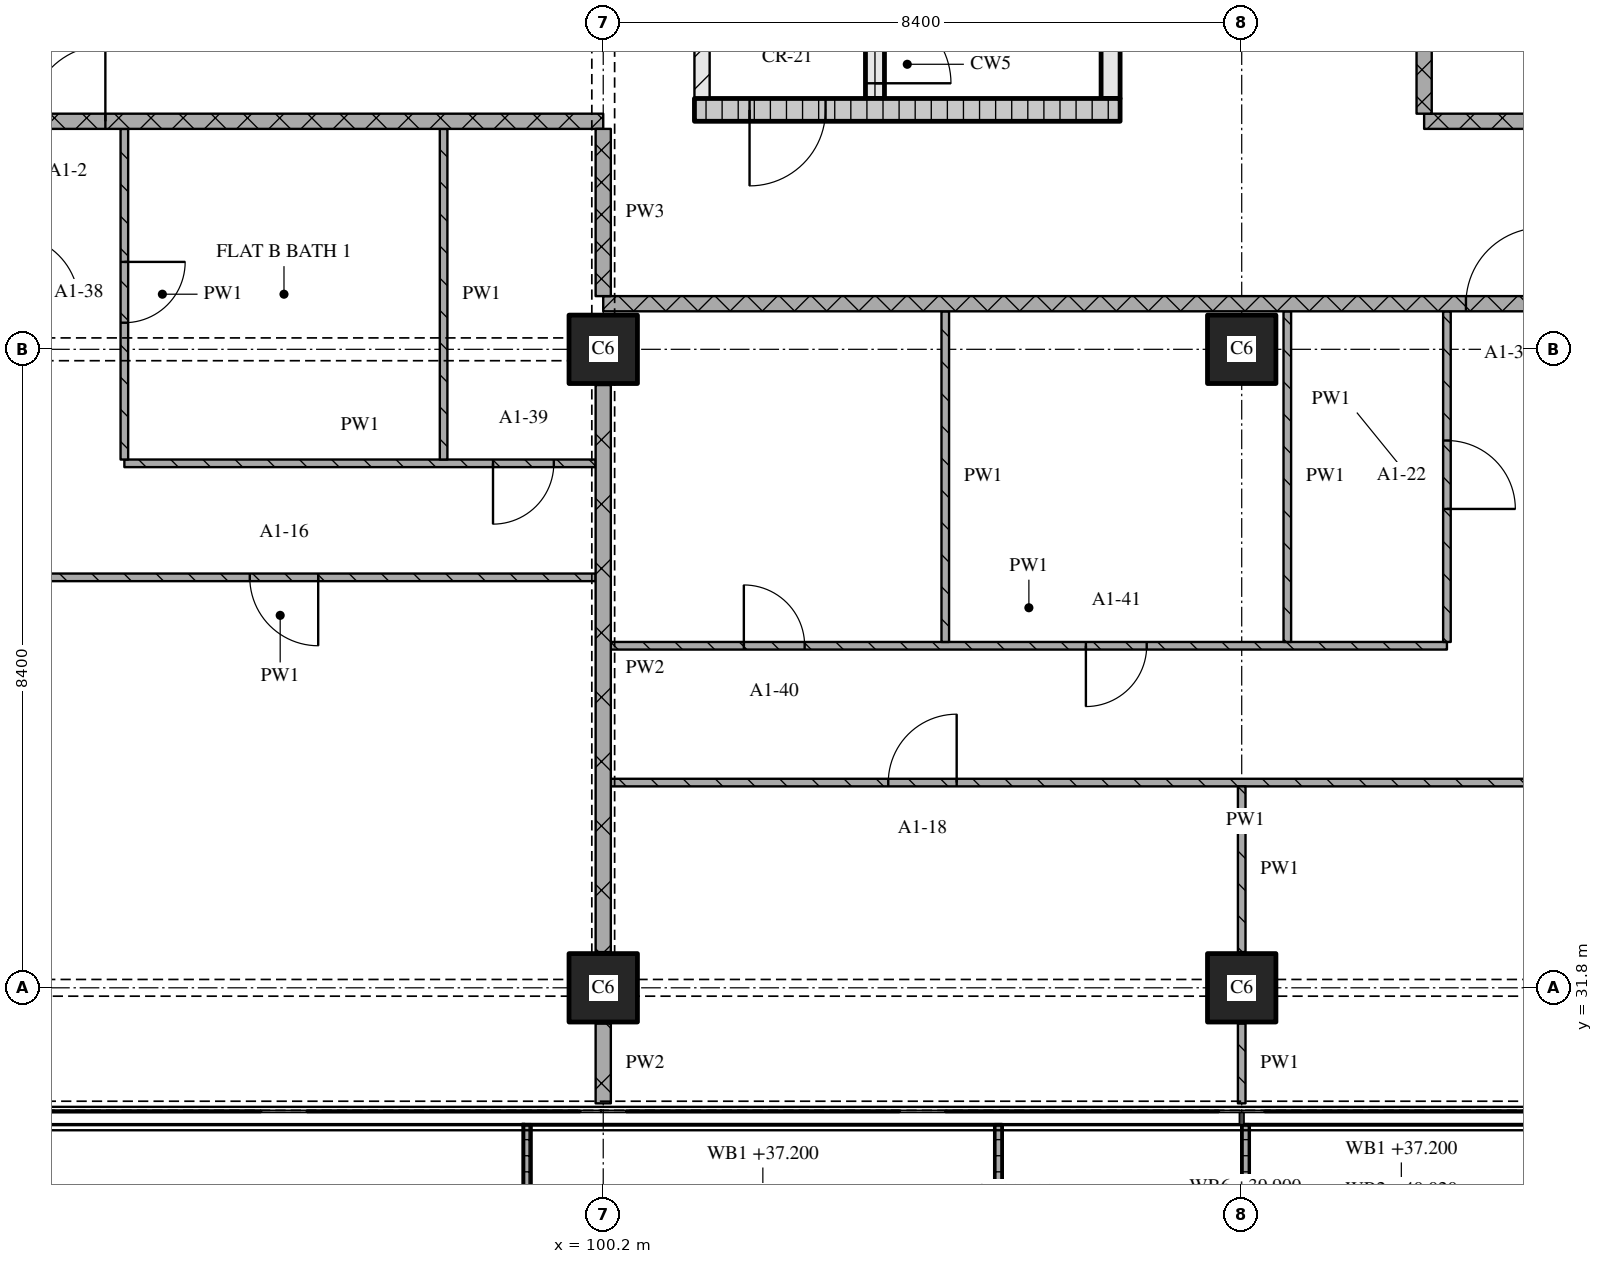
"""IFC4 building model, lengths in metres.
Left out: names, types, materials, properties, quantities, classifications, styles, units other than length and angle.
Written with IfcOpenShell. Run it as: python <this file> out.ifc"""

import sys

from ifc_helpers import new_model, si_unit, direction, frame, frame_2d, origin, origin_2d, place, context, subcontext, project, spatial, polyline, rectangle, outline, extrude, element, fill, save


model = new_model("IFC4")
c1 = context("Model", 3, precision=1e-05, world=origin(), true_north=direction((0.0, 1.0)))
c2 = subcontext(c1, "Body", "Model", "MODEL_VIEW")
j1 = project(units=[si_unit("LENGTHUNIT", "METRE"), si_unit("PLANEANGLEUNIT", "RADIAN")], contexts=[c1])
p1 = place(None, origin())
s1 = spatial("IfcSite", under=j1, at=p1, CompositionType="ELEMENT")
p2 = place(p1, origin())
s2 = spatial("IfcBuilding", under=s1, at=p2, CompositionType="ELEMENT")
p3 = place(p2, frame((0.0, 0.0, 37.2)))
s3 = spatial("IfcBuildingStorey", under=s2, at=p3, CompositionType="ELEMENT", Elevation=37.2)
for number, where, z_axis, x_axis in (
    (1, (100.2, 31.8, 0.0), (0.0, 0.0, 1.0), (1.0, 0.0, 0.0)),
    (2, (100.2, 40.2, 0.0), (0.0, 0.0, 1.0), (1.0, 0.0, 0.0)),
    (3, (108.6, 31.8, 0.0), (0.0, 0.0, 1.0), (1.0, 0.0, 0.0)),
    (4, (108.6, 40.2, 0.0), (0.0, 0.0, 1.0), (1.0, 0.0, 0.0)),
):
    element("IfcColumn", number, at=place(p3, frame(where, z_axis=z_axis, x_axis=x_axis)), inside=s3, PredefinedType="COLUMN", context=c2, shape_type="SweptSolid", body=[
        extrude(rectangle(XDim=0.9, YDim=0.9, at=origin_2d()), origin(), (0.0, 0.0, 1.0), 3.6),
    ])
p4 = place(p3, origin())
e5 = element("IfcWall", 5, at=p4, inside=s3, PredefinedType="SOLIDWALL", context=c2, shape_type="SweptSolid", body=[
    extrude(outline(polyline([(99.15, 30.0), (99.25, 30.0), (99.25, 28.233), (105.35, 28.233), (105.35, 30.0), (105.45, 30.0), (105.45, 28.133), (99.15, 28.133), (99.15, 30.0)])), origin(), (0.0, 0.0, 1.0), 1.0),
])
p5 = place(p3, origin())
e6 = element("IfcWall", 6, at=p5, inside=s3, PredefinedType="SOLIDWALL", context=c2, shape_type="SweptSolid", body=[
    extrude(outline(polyline([(108.6, 30.0), (108.7, 30.0), (108.7, 28.367), (112.7, 28.367), (112.7, 30.0), (112.8, 30.0), (112.8, 28.267), (108.6, 28.267), (108.6, 30.0)])), origin(), (0.0, 0.0, 1.0), 1.0),
])
p6 = place(p3, frame((101.4, 43.35, 0.0), z_axis=(0.0, 0.0, 1.0), x_axis=(1.0, 0.0, 0.0)))
e7 = element("IfcWall", 7, at=p6, inside=s3, PredefinedType="SOLIDWALL", context=c2, shape_type="SweptSolid", body=[
    extrude(rectangle(XDim=5.6, YDim=0.3, at=frame_2d((2.8, 0.0))), origin(), (0.0, 0.0, 1.0), 3.32),
])
p7 = place(p6, frame((0.725, 0.0, 0.0)))
e8 = element("IfcOpeningElement", 8, at=p7, cuts=e7, PredefinedType="OPENING", context=c2, shape_type="SweptSolid", body=[
    extrude(rectangle(XDim=1.0, YDim=2.1, at=frame_2d((0.5, 1.05))), frame((0.0, 0.16, 0.0), z_axis=(0.0, -1.0, 0.0), x_axis=(1.0, 0.0, 0.0)), (0.0, 0.0, 1.0), 0.32),
])
p8 = place(p3, frame((101.5, 43.5, 0.0), z_axis=(0.0, 0.0, 1.0), x_axis=(0.0, 1.0, 0.0)))
e9 = element("IfcWall", 9, at=p8, inside=s3, PredefinedType="PARTITIONING", context=c2, shape_type="SweptSolid", body=[
    extrude(rectangle(XDim=6.9, YDim=0.2, at=frame_2d((3.45, 0.0))), origin(), (0.0, 0.0, 1.0), 3.32),
])
p9 = place(p8, frame((1.0, 0.0, 0.0)))
e10 = element("IfcOpeningElement", 10, at=p9, cuts=e9, PredefinedType="OPENING", context=c2, shape_type="SweptSolid", body=[
    extrude(rectangle(XDim=1.0, YDim=2.1, at=frame_2d((0.5, 1.05))), frame((0.0, 0.11, 0.0), z_axis=(0.0, -1.0, 0.0), x_axis=(1.0, 0.0, 0.0)), (0.0, 0.0, 1.0), 0.22),
])
p10 = place(p3, frame((103.775, 43.5, 0.0), z_axis=(0.0, 0.0, 1.0), x_axis=(0.0, 1.0, 0.0)))
e11 = element("IfcWall", 11, at=p10, inside=s3, PredefinedType="SOLIDWALL", context=c2, shape_type="SweptSolid", body=[
    extrude(rectangle(XDim=6.9, YDim=0.25, at=frame_2d((3.45, 0.0))), origin(), (0.0, 0.0, 1.0), 3.32),
])
p11 = place(p10, frame((0.2, 0.0, 0.0)))
e12 = element("IfcOpeningElement", 12, at=p11, cuts=e11, PredefinedType="OPENING", context=c2, shape_type="SweptSolid", body=[
    extrude(rectangle(XDim=1.0, YDim=2.1, at=frame_2d((0.5, 1.05))), frame((0.0, 0.135, 0.0), z_axis=(0.0, -1.0, 0.0), x_axis=(1.0, 0.0, 0.0)), (0.0, 0.0, 1.0), 0.27),
])
p12 = place(p3, frame((106.875, 43.5, 0.0), z_axis=(0.0, 0.0, 1.0), x_axis=(0.0, 1.0, 0.0)))
e13 = element("IfcWall", 13, at=p12, inside=s3, PredefinedType="SOLIDWALL", context=c2, shape_type="SweptSolid", body=[
    extrude(rectangle(XDim=6.9, YDim=0.25, at=frame_2d((3.45, 0.0))), origin(), (0.0, 0.0, 1.0), 3.32),
])
p13 = place(p3, frame((117.0, 34.5, 0.0), z_axis=(0.0, 0.0, 1.0), x_axis=(-1.0, 0.0, 0.0)))
e14 = element("IfcWall", 14, at=p13, inside=s3, PredefinedType="PARTITIONING", context=c2, shape_type="SweptSolid", body=[
    extrude(rectangle(XDim=16.7, YDim=0.1, at=frame_2d((8.35, 0.0))), origin(), (0.0, 0.0, 1.0), 3.32),
])
p14 = place(p13, frame((12.15, 0.0, 0.0)))
e15 = element("IfcOpeningElement", 15, at=p14, cuts=e14, PredefinedType="OPENING", context=c2, shape_type="SweptSolid", body=[
    extrude(rectangle(XDim=0.9, YDim=2.1, at=frame_2d((0.45, 1.05))), frame((0.0, 0.06, 0.0), z_axis=(0.0, -1.0, 0.0), x_axis=(1.0, 0.0, 0.0)), (0.0, 0.0, 1.0), 0.12),
])
p15 = place(p3, frame((100.3, 36.3, 0.0), z_axis=(0.0, 0.0, 1.0), x_axis=(1.0, 0.0, 0.0)))
e16 = element("IfcWall", 16, at=p15, inside=s3, PredefinedType="PARTITIONING", context=c2, shape_type="SweptSolid", body=[
    extrude(rectangle(XDim=11.0, YDim=0.1, at=frame_2d((5.5, 0.0))), origin(), (0.0, 0.0, 1.0), 3.32),
])
p16 = place(p15, frame((1.75, 0.0, 0.0)))
e17 = element("IfcOpeningElement", 17, at=p16, cuts=e16, PredefinedType="OPENING", context=c2, shape_type="SweptSolid", body=[
    extrude(rectangle(XDim=0.8, YDim=2.1, at=frame_2d((0.4, 1.05))), frame((0.0, 0.06, 0.0), z_axis=(0.0, -1.0, 0.0), x_axis=(1.0, 0.0, 0.0)), (0.0, 0.0, 1.0), 0.12),
])
p17 = place(p15, frame((6.25, 0.0, 0.0)))
e18 = element("IfcOpeningElement", 18, at=p17, cuts=e16, PredefinedType="OPENING", context=c2, shape_type="SweptSolid", body=[
    extrude(rectangle(XDim=0.8, YDim=2.1, at=frame_2d((0.4, 1.05))), frame((0.0, 0.06, 0.0), z_axis=(0.0, -1.0, 0.0), x_axis=(1.0, 0.0, 0.0)), (0.0, 0.0, 1.0), 0.12),
])
p18 = place(p3, frame((100.1, 37.2, 0.0), z_axis=(0.0, 0.0, 1.0), x_axis=(-1.0, 0.0, 0.0)))
e19 = element("IfcWall", 19, at=p18, inside=s3, PredefinedType="PARTITIONING", context=c2, shape_type="SweptSolid", body=[
    extrude(rectangle(XDim=8.3, YDim=0.1, at=frame_2d((4.15, 0.0))), origin(), (0.0, 0.0, 1.0), 3.32),
])
p19 = place(p18, frame((3.65, 0.0, 0.0)))
e20 = element("IfcOpeningElement", 20, at=p19, cuts=e19, PredefinedType="OPENING", context=c2, shape_type="SweptSolid", body=[
    extrude(rectangle(XDim=0.9, YDim=2.1, at=frame_2d((0.45, 1.05))), frame((0.0, 0.06, 0.0), z_axis=(0.0, -1.0, 0.0), x_axis=(1.0, 0.0, 0.0)), (0.0, 0.0, 1.0), 0.12),
])
p20 = place(p3, frame((93.9, 38.7, 0.0), z_axis=(0.0, 0.0, 1.0), x_axis=(1.0, 0.0, 0.0)))
e21 = element("IfcWall", 21, at=p20, inside=s3, PredefinedType="PARTITIONING", context=c2, shape_type="SweptSolid", body=[
    extrude(rectangle(XDim=6.2, YDim=0.1, at=frame_2d((3.1, 0.0))), origin(), (0.0, 0.0, 1.0), 3.32),
])
p21 = place(p20, frame((4.85, 0.0, 0.0)))
e22 = element("IfcOpeningElement", 22, at=p21, cuts=e21, PredefinedType="OPENING", context=c2, shape_type="SweptSolid", body=[
    extrude(rectangle(XDim=0.8, YDim=2.1, at=frame_2d((0.4, 1.05))), frame((0.0, 0.06, 0.0), z_axis=(0.0, -1.0, 0.0), x_axis=(1.0, 0.0, 0.0)), (0.0, 0.0, 1.0), 0.12),
])
p22 = place(p3, frame((124.28, 40.8, 0.0), z_axis=(0.0, 0.0, 1.0), x_axis=(-1.0, 0.0, 0.0)))
e23 = element("IfcWall", 23, at=p22, inside=s3, PredefinedType="PARTITIONING", context=c2, shape_type="SweptSolid", body=[
    extrude(rectangle(XDim=24.08, YDim=0.2, at=frame_2d((12.04, 0.0))), origin(), (0.0, 0.0, 1.0), 3.32),
])
p23 = place(p22, frame((11.73, 0.0, 0.0)))
e24 = element("IfcOpeningElement", 24, at=p23, cuts=e23, PredefinedType="OPENING", context=c2, shape_type="SweptSolid", body=[
    extrude(rectangle(XDim=1.0, YDim=2.1, at=frame_2d((0.5, 1.05))), frame((0.0, 0.11, 0.0), z_axis=(0.0, -1.0, 0.0), x_axis=(1.0, 0.0, 0.0)), (0.0, 0.0, 1.0), 0.22),
])
p24 = place(p3, frame((100.2, 43.2, 0.0), z_axis=(0.0, 0.0, 1.0), x_axis=(-1.0, 0.0, 0.0)))
e25 = element("IfcWall", 25, at=p24, inside=s3, PredefinedType="PARTITIONING", context=c2, shape_type="SweptSolid", body=[
    extrude(rectangle(XDim=25.2, YDim=0.2, at=frame_2d((12.6, 0.0))), origin(), (0.0, 0.0, 1.0), 3.32),
])
p25 = place(p24, frame((6.55, 0.0, 0.0)))
e26 = element("IfcOpeningElement", 26, at=p25, cuts=e25, PredefinedType="OPENING", context=c2, shape_type="SweptSolid", body=[
    extrude(rectangle(XDim=1.0, YDim=2.1, at=frame_2d((0.5, 1.05))), frame((0.0, 0.11, 0.0), z_axis=(0.0, -1.0, 0.0), x_axis=(1.0, 0.0, 0.0)), (0.0, 0.0, 1.0), 0.22),
])
p26 = place(p3, frame((111.0, 43.2, 0.0), z_axis=(0.0, 0.0, 1.0), x_axis=(1.0, 0.0, 0.0)))
e27 = element("IfcWall", 27, at=p26, inside=s3, PredefinedType="PARTITIONING", context=c2, shape_type="SweptSolid", body=[
    extrude(rectangle(XDim=15.92, YDim=0.2, at=frame_2d((7.96, 0.0))), origin(), (0.0, 0.0, 1.0), 3.32),
])
p27 = place(p26, frame((10.05, 0.0, 0.0)))
e28 = element("IfcOpeningElement", 28, at=p27, cuts=e27, PredefinedType="OPENING", context=c2, shape_type="SweptSolid", body=[
    extrude(rectangle(XDim=1.0, YDim=2.1, at=frame_2d((0.5, 1.05))), frame((0.0, 0.11, 0.0), z_axis=(0.0, -1.0, 0.0), x_axis=(1.0, 0.0, 0.0)), (0.0, 0.0, 1.0), 0.22),
])
p28 = place(p3, frame((93.9, 43.1, 0.0), z_axis=(0.0, 0.0, 1.0), x_axis=(0.0, -1.0, 0.0)))
e29 = element("IfcWall", 29, at=p28, inside=s3, PredefinedType="PARTITIONING", context=c2, shape_type="SweptSolid", body=[
    extrude(rectangle(XDim=4.35, YDim=0.1, at=frame_2d((2.175, 0.0))), origin(), (0.0, 0.0, 1.0), 3.32),
])
p29 = place(p28, frame((1.75, 0.0, 0.0)))
e30 = element("IfcOpeningElement", 30, at=p29, cuts=e29, PredefinedType="OPENING", context=c2, shape_type="SweptSolid", body=[
    extrude(rectangle(XDim=0.8, YDim=2.1, at=frame_2d((0.4, 1.05))), frame((0.0, 0.06, 0.0), z_axis=(0.0, -1.0, 0.0), x_axis=(1.0, 0.0, 0.0)), (0.0, 0.0, 1.0), 0.12),
])
p30 = place(p3, frame((98.1, 43.1, 0.0), z_axis=(0.0, 0.0, 1.0), x_axis=(0.0, -1.0, 0.0)))
e31 = element("IfcWall", 31, at=p30, inside=s3, PredefinedType="PARTITIONING", context=c2, shape_type="SweptSolid", body=[
    extrude(rectangle(XDim=4.35, YDim=0.1, at=frame_2d((2.175, 0.0))), origin(), (0.0, 0.0, 1.0), 3.32),
])
p31 = place(p3, frame((100.2, 43.1, 0.0), z_axis=(0.0, 0.0, 1.0), x_axis=(0.0, -1.0, 0.0)))
e32 = element("IfcWall", 32, at=p31, inside=s3, PredefinedType="PARTITIONING", context=c2, shape_type="SweptSolid", body=[
    extrude(rectangle(XDim=2.2, YDim=0.2, at=frame_2d((1.1, 0.0))), origin(), (0.0, 0.0, 1.0), 2.43),
])
p32 = place(p3, frame((100.2, 31.33, 0.0), z_axis=(0.0, 0.0, 1.0), x_axis=(0.0, -1.0, 0.0)))
e33 = element("IfcWall", 33, at=p32, inside=s3, PredefinedType="PARTITIONING", context=c2, shape_type="SweptSolid", body=[
    extrude(rectangle(XDim=1.05, YDim=0.2, at=frame_2d((0.525, 0.0))), origin(), (0.0, 0.0, 1.0), 3.32),
])
p33 = place(p3, frame((100.2, 39.73, 0.0), z_axis=(0.0, 0.0, 1.0), x_axis=(0.0, -1.0, 0.0)))
e34 = element("IfcWall", 34, at=p33, inside=s3, PredefinedType="PARTITIONING", context=c2, shape_type="SweptSolid", body=[
    extrude(rectangle(XDim=7.46, YDim=0.2, at=frame_2d((3.73, 0.0))), origin(), (0.0, 0.0, 1.0), 2.83),
])
p34 = place(p3, frame((104.7, 40.7, 0.0), z_axis=(0.0, 0.0, 1.0), x_axis=(0.0, -1.0, 0.0)))
e35 = element("IfcWall", 35, at=p34, inside=s3, PredefinedType="PARTITIONING", context=c2, shape_type="SweptSolid", body=[
    extrude(rectangle(XDim=4.35, YDim=0.1, at=frame_2d((2.175, 0.0))), origin(), (0.0, 0.0, 1.0), 3.32),
])
p35 = place(p3, frame((108.6, 31.33, 0.0), z_axis=(0.0, 0.0, 1.0), x_axis=(0.0, -1.0, 0.0)))
e36 = element("IfcWall", 36, at=p35, inside=s3, PredefinedType="PARTITIONING", context=c2, shape_type="SweptSolid", body=[
    extrude(rectangle(XDim=1.05, YDim=0.1, at=frame_2d((0.525, 0.0))), origin(), (0.0, 0.0, 1.0), 3.32),
])
p36 = place(p3, frame((108.6, 34.45, 0.0), z_axis=(0.0, 0.0, 1.0), x_axis=(0.0, -1.0, 0.0)))
e37 = element("IfcWall", 37, at=p36, inside=s3, PredefinedType="PARTITIONING", context=c2, shape_type="SweptSolid", body=[
    extrude(rectangle(XDim=2.18, YDim=0.1, at=frame_2d((1.09, 0.0))), origin(), (0.0, 0.0, 1.0), 3.32),
])
p37 = place(p3, frame((109.2, 40.7, 0.0), z_axis=(0.0, 0.0, 1.0), x_axis=(0.0, -1.0, 0.0)))
e38 = element("IfcWall", 38, at=p37, inside=s3, PredefinedType="PARTITIONING", context=c2, shape_type="SweptSolid", body=[
    extrude(rectangle(XDim=4.35, YDim=0.1, at=frame_2d((2.175, 0.0))), origin(), (0.0, 0.0, 1.0), 3.32),
])
p38 = place(p3, frame((111.0, 75.32, 0.0), z_axis=(0.0, 0.0, 1.0), x_axis=(0.0, -1.0, 0.0)))
e39 = element("IfcWall", 39, at=p38, inside=s3, PredefinedType="PARTITIONING", context=c2, shape_type="SweptSolid", body=[
    extrude(rectangle(XDim=32.02, YDim=0.2, at=frame_2d((16.01, 0.0))), origin(), (0.0, 0.0, 1.0), 3.32),
])
p39 = place(p38, frame((5.67, 0.0, 0.0)))
e40 = element("IfcOpeningElement", 40, at=p39, cuts=e39, PredefinedType="OPENING", context=c2, shape_type="SweptSolid", body=[
    extrude(rectangle(XDim=1.0, YDim=2.1, at=frame_2d((0.5, 1.05))), frame((0.0, 0.11, 0.0), z_axis=(0.0, -1.0, 0.0), x_axis=(1.0, 0.0, 0.0)), (0.0, 0.0, 1.0), 0.22),
])
p40 = place(p3, frame((111.3, 36.35, 0.0), z_axis=(0.0, 0.0, 1.0), x_axis=(0.0, 1.0, 0.0)))
e41 = element("IfcWall", 41, at=p40, inside=s3, PredefinedType="PARTITIONING", context=c2, shape_type="SweptSolid", body=[
    extrude(rectangle(XDim=4.35, YDim=0.1, at=frame_2d((2.175, 0.0))), origin(), (0.0, 0.0, 1.0), 3.32),
])
p41 = place(p40, frame((1.75, 0.0, 0.0)))
e42 = element("IfcOpeningElement", 42, at=p41, cuts=e41, PredefinedType="OPENING", context=c2, shape_type="SweptSolid", body=[
    extrude(rectangle(XDim=0.9, YDim=2.1, at=frame_2d((0.45, 1.05))), frame((0.0, 0.06, 0.0), z_axis=(0.0, -1.0, 0.0), x_axis=(1.0, 0.0, 0.0)), (0.0, 0.0, 1.0), 0.12),
])
p42 = place(p7, origin())
e43 = element("IfcDoor", 43, at=p42, inside=s3, OperationType="SINGLE_SWING_RIGHT", PredefinedType="DOOR", context=c2, shape_type="SweptSolid", body=[
    extrude(rectangle(XDim=1.0, YDim=2.1, at=frame_2d((0.5, 1.05))), frame((0.0, 0.025, 0.0), z_axis=(0.0, -1.0, 0.0), x_axis=(1.0, 0.0, 0.0)), (0.0, 0.0, 1.0), 0.05),
])
fill(e8, e43)
p43 = place(p11, origin())
e44 = element("IfcDoor", 44, at=p43, inside=s3, OperationType="SINGLE_SWING_RIGHT", PredefinedType="DOOR", context=c2, shape_type="SweptSolid", body=[
    extrude(rectangle(XDim=1.0, YDim=2.1, at=frame_2d((0.5, 1.05))), frame((0.0, 0.025, 0.0), z_axis=(0.0, -1.0, 0.0), x_axis=(1.0, 0.0, 0.0)), (0.0, 0.0, 1.0), 0.05),
])
fill(e12, e44)
p44 = place(p14, origin())
e45 = element("IfcDoor", 45, at=p44, inside=s3, OperationType="SINGLE_SWING_RIGHT", PredefinedType="DOOR", context=c2, shape_type="SweptSolid", body=[
    extrude(rectangle(XDim=0.9, YDim=2.1, at=frame_2d((0.45, 1.05))), frame((0.0, 0.025, 0.0), z_axis=(0.0, -1.0, 0.0), x_axis=(1.0, 0.0, 0.0)), (0.0, 0.0, 1.0), 0.05),
])
fill(e15, e45)
p45 = place(p16, origin())
e46 = element("IfcDoor", 46, at=p45, inside=s3, OperationType="SINGLE_SWING_LEFT", PredefinedType="DOOR", context=c2, shape_type="SweptSolid", body=[
    extrude(rectangle(XDim=0.8, YDim=2.1, at=frame_2d((0.4, 1.05))), frame((0.0, 0.025, 0.0), z_axis=(0.0, -1.0, 0.0), x_axis=(1.0, 0.0, 0.0)), (0.0, 0.0, 1.0), 0.05),
])
fill(e17, e46)
p46 = place(p17, origin())
e47 = element("IfcDoor", 47, at=p46, inside=s3, OperationType="SINGLE_SWING_RIGHT", PredefinedType="DOOR", context=c2, shape_type="SweptSolid", body=[
    extrude(rectangle(XDim=0.8, YDim=2.1, at=frame_2d((0.4, 1.05))), frame((0.0, 0.025, 0.0), z_axis=(0.0, -1.0, 0.0), x_axis=(1.0, 0.0, 0.0)), (0.0, 0.0, 1.0), 0.05),
])
fill(e18, e47)
p47 = place(p19, origin())
e48 = element("IfcDoor", 48, at=p47, inside=s3, OperationType="SINGLE_SWING_LEFT", PredefinedType="DOOR", context=c2, shape_type="SweptSolid", body=[
    extrude(rectangle(XDim=0.9, YDim=2.1, at=frame_2d((0.45, 1.05))), frame((0.0, 0.025, 0.0), z_axis=(0.0, -1.0, 0.0), x_axis=(1.0, 0.0, 0.0)), (0.0, 0.0, 1.0), 0.05),
])
fill(e20, e48)
p48 = place(p21, origin())
e49 = element("IfcDoor", 49, at=p48, inside=s3, OperationType="SINGLE_SWING_RIGHT", PredefinedType="DOOR", context=c2, shape_type="SweptSolid", body=[
    extrude(rectangle(XDim=0.8, YDim=2.1, at=frame_2d((0.4, 1.05))), frame((0.0, 0.025, 0.0), z_axis=(0.0, -1.0, 0.0), x_axis=(1.0, 0.0, 0.0)), (0.0, 0.0, 1.0), 0.05),
])
fill(e22, e49)
p49 = place(p23, origin())
e50 = element("IfcDoor", 50, at=p49, inside=s3, OperationType="SINGLE_SWING_RIGHT", PredefinedType="DOOR", context=c2, shape_type="SweptSolid", body=[
    extrude(rectangle(XDim=1.0, YDim=2.1, at=frame_2d((0.5, 1.05))), frame((0.0, 0.025, 0.0), z_axis=(0.0, -1.0, 0.0), x_axis=(1.0, 0.0, 0.0)), (0.0, 0.0, 1.0), 0.05),
])
fill(e24, e50)
p50 = place(p25, origin())
e51 = element("IfcDoor", 51, at=p50, inside=s3, OperationType="SINGLE_SWING_RIGHT", PredefinedType="DOOR", context=c2, shape_type="SweptSolid", body=[
    extrude(rectangle(XDim=1.0, YDim=2.1, at=frame_2d((0.5, 1.05))), frame((0.0, 0.025, 0.0), z_axis=(0.0, -1.0, 0.0), x_axis=(1.0, 0.0, 0.0)), (0.0, 0.0, 1.0), 0.05),
])
fill(e26, e51)
p51 = place(p29, origin())
e52 = element("IfcDoor", 52, at=p51, inside=s3, OperationType="SINGLE_SWING_LEFT", PredefinedType="DOOR", context=c2, shape_type="SweptSolid", body=[
    extrude(rectangle(XDim=0.8, YDim=2.1, at=frame_2d((0.4, 1.05))), frame((0.0, 0.025, 0.0), z_axis=(0.0, -1.0, 0.0), x_axis=(1.0, 0.0, 0.0)), (0.0, 0.0, 1.0), 0.05),
])
fill(e30, e52)
p52 = place(p41, origin())
e53 = element("IfcDoor", 53, at=p52, inside=s3, OperationType="SINGLE_SWING_RIGHT", PredefinedType="DOOR", context=c2, shape_type="SweptSolid", body=[
    extrude(rectangle(XDim=0.9, YDim=2.1, at=frame_2d((0.45, 1.05))), frame((0.0, 0.025, 0.0), z_axis=(0.0, -1.0, 0.0), x_axis=(1.0, 0.0, 0.0)), (0.0, 0.0, 1.0), 0.05),
])
fill(e42, e53)
save(model, sys.argv[1])
